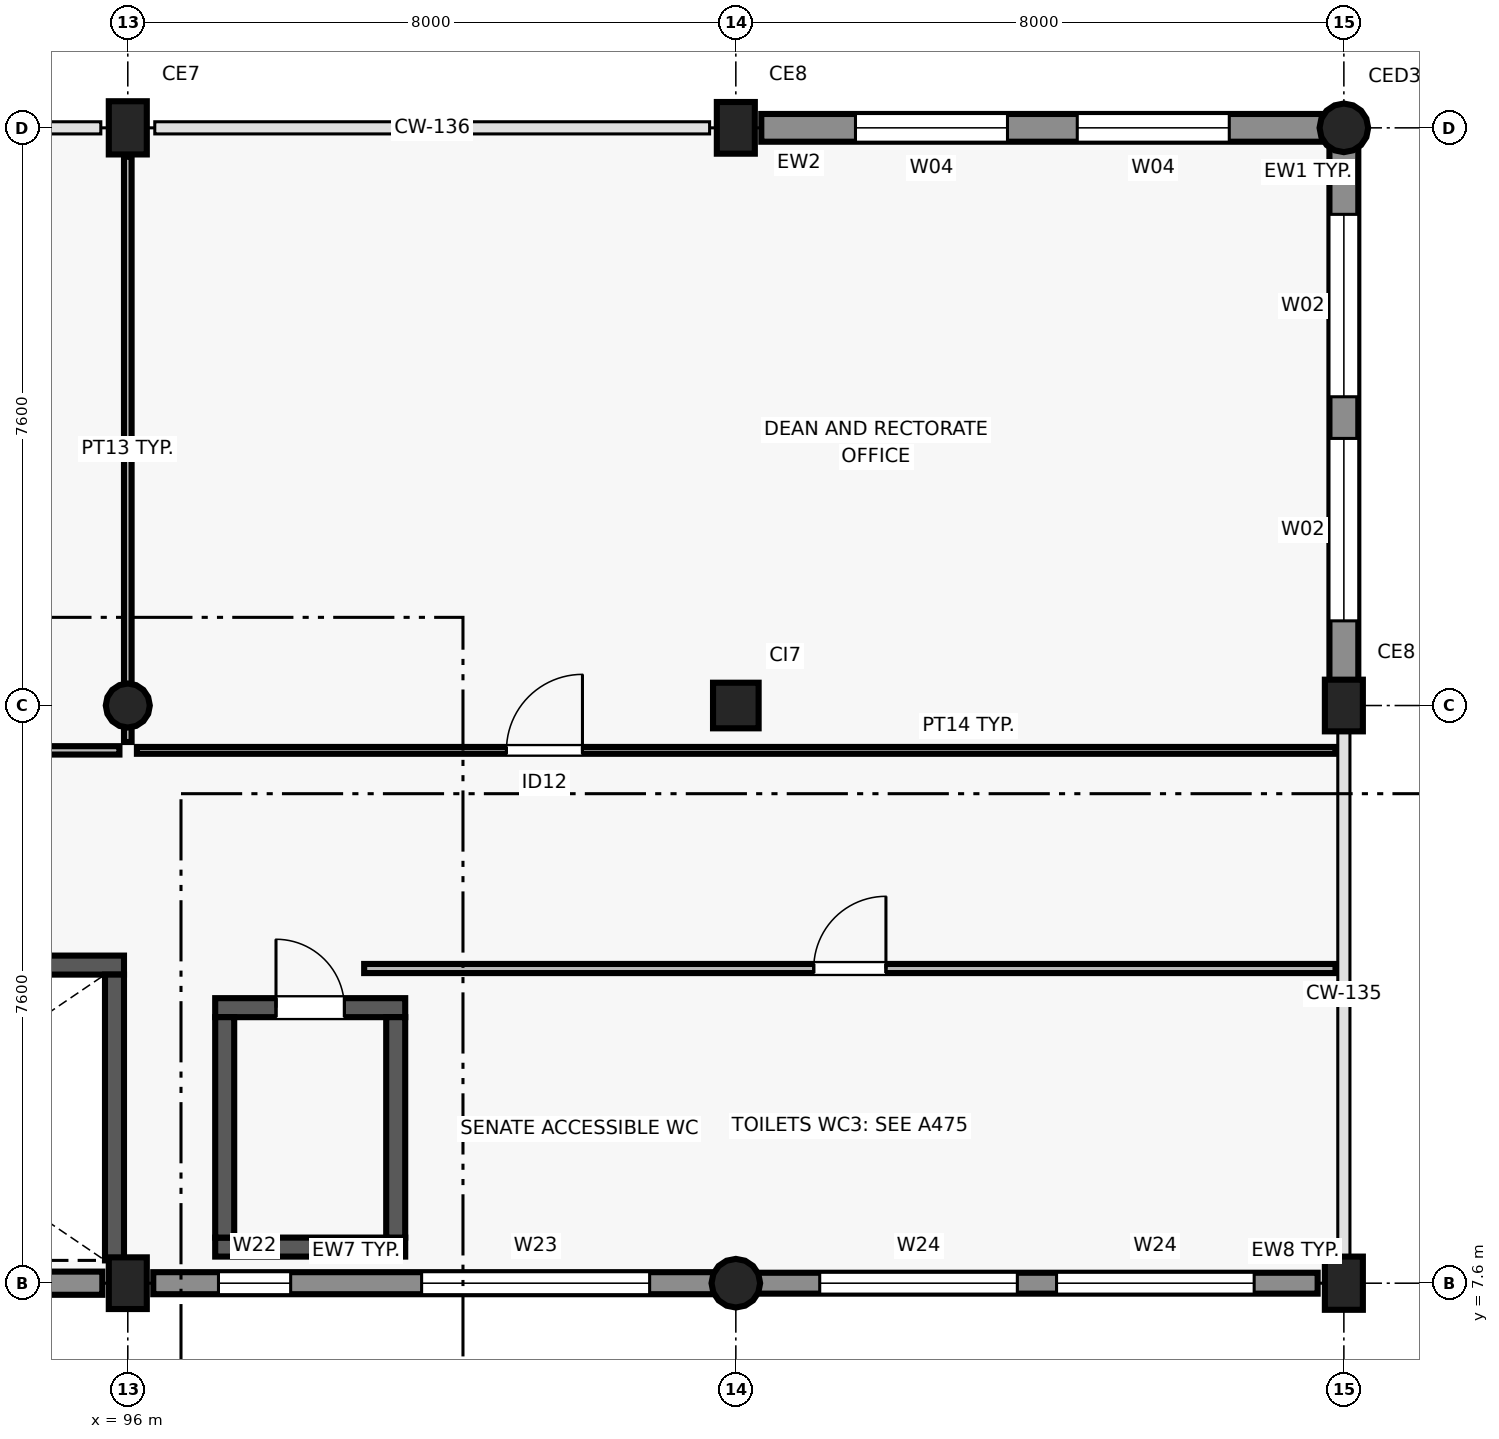
"""IFC4 building model, lengths in metres.
Left out: names, types, materials, properties, quantities, classifications, styles, units other than length and angle.
Written with IfcOpenShell. Run it as: python <this file> out.ifc"""

import sys

from ifc_helpers import new_model, si_unit, direction, frame, frame_2d, origin, origin_2d, place, context, subcontext, project, spatial, rectangle, circle, extrude, element, fill, save


model = new_model("IFC4")
c1 = context("Model", 3, precision=1e-05, world=origin(), true_north=direction((0.0, 1.0)))
c2 = subcontext(c1, "Body", "Model", "MODEL_VIEW")
j1 = project(units=[si_unit("LENGTHUNIT", "METRE"), si_unit("PLANEANGLEUNIT", "RADIAN")], contexts=[c1])
p1 = place(None, origin())
s1 = spatial("IfcSite", under=j1, at=p1, CompositionType="ELEMENT")
p2 = place(p1, origin())
s2 = spatial("IfcBuilding", under=s1, at=p2, CompositionType="ELEMENT")
p3 = place(p2, frame((0.0, 0.0, 13.2)))
s3 = spatial("IfcBuildingStorey", under=s2, at=p3, CompositionType="ELEMENT", Elevation=13.2)
p4 = place(p3, frame((96.0, 7.6, 0.0), z_axis=(0.0, 0.0, 1.0), x_axis=(1.0, 0.0, 0.0)))
e1 = element("IfcColumn", 1, at=p4, inside=s3, PredefinedType="COLUMN", context=c2, shape_type="SweptSolid", body=[
    extrude(rectangle(XDim=0.68, YDim=0.5, at=origin_2d()), origin(), (0.0, 0.0, 1.0), 4.2),
])
p5 = place(p3, frame((96.0, 15.2, 0.0), z_axis=(0.0, 0.0, 1.0), x_axis=(1.0, 0.0, 0.0)))
e2 = element("IfcColumn", 2, at=p5, inside=s3, PredefinedType="COLUMN", context=c2, shape_type="SweptSolid", body=[
    extrude(circle(Radius=0.29, at=origin_2d()), origin(), (0.0, 0.0, 1.0), 4.2),
])
p6 = place(p3, frame((96.0, 22.8, 0.0), z_axis=(0.0, 0.0, 1.0), x_axis=(1.0, 0.0, 0.0)))
e3 = element("IfcColumn", 3, at=p6, inside=s3, PredefinedType="COLUMN", context=c2, shape_type="SweptSolid", body=[
    extrude(rectangle(XDim=0.7, YDim=0.5, at=origin_2d()), origin(), (0.0, 0.0, 1.0), 4.2),
])
p7 = place(p3, frame((104.0, 7.6, 0.0), z_axis=(0.0, 0.0, 1.0), x_axis=(1.0, 0.0, 0.0)))
e4 = element("IfcColumn", 4, at=p7, inside=s3, PredefinedType="COLUMN", context=c2, shape_type="SweptSolid", body=[
    extrude(circle(Radius=0.32, at=origin_2d()), origin(), (0.0, 0.0, 1.0), 4.2),
])
p8 = place(p3, frame((104.0, 15.2, 0.0), z_axis=(0.0, 0.0, 1.0), x_axis=(1.0, 0.0, 0.0)))
e5 = element("IfcColumn", 5, at=p8, inside=s3, PredefinedType="COLUMN", context=c2, shape_type="SweptSolid", body=[
    extrude(rectangle(XDim=0.6, YDim=0.6, at=origin_2d()), origin(), (0.0, 0.0, 1.0), 4.2),
])
p9 = place(p3, frame((104.0, 22.8, 0.0), z_axis=(0.0, 0.0, 1.0), x_axis=(1.0, 0.0, 0.0)))
e6 = element("IfcColumn", 6, at=p9, inside=s3, PredefinedType="COLUMN", context=c2, shape_type="SweptSolid", body=[
    extrude(rectangle(XDim=0.68, YDim=0.5, at=origin_2d()), origin(), (0.0, 0.0, 1.0), 4.2),
])
p10 = place(p3, frame((112.0, 7.6, 0.0), z_axis=(0.0, 0.0, 1.0), x_axis=(1.0, 0.0, 0.0)))
e7 = element("IfcColumn", 7, at=p10, inside=s3, PredefinedType="COLUMN", context=c2, shape_type="SweptSolid", body=[
    extrude(rectangle(XDim=0.7, YDim=0.5, at=origin_2d()), origin(), (0.0, 0.0, 1.0), 4.2),
])
p11 = place(p3, frame((112.0, 15.2, 0.0), z_axis=(0.0, 0.0, 1.0), x_axis=(1.0, 0.0, 0.0)))
e8 = element("IfcColumn", 8, at=p11, inside=s3, PredefinedType="COLUMN", context=c2, shape_type="SweptSolid", body=[
    extrude(rectangle(XDim=0.68, YDim=0.5, at=origin_2d()), origin(), (0.0, 0.0, 1.0), 4.2),
])
p12 = place(p3, frame((112.0, 22.8, 0.0), z_axis=(0.0, 0.0, 1.0), x_axis=(1.0, 0.0, 0.0)))
e9 = element("IfcColumn", 9, at=p12, inside=s3, PredefinedType="COLUMN", context=c2, shape_type="SweptSolid", body=[
    extrude(circle(Radius=0.32, at=origin_2d()), origin(), (0.0, 0.0, 1.0), 4.2),
])
p13 = place(p3, frame((88.345, 7.6, 0.0), z_axis=(0.0, 0.0, 1.0), x_axis=(1.0, 0.0, 0.0)))
e10 = element("IfcWall", 10, at=p13, inside=s3, PredefinedType="SOLIDWALL", context=c2, shape_type="SweptSolid", body=[
    extrude(rectangle(XDim=7.32, YDim=0.305, at=frame_2d((3.66, 0.0))), origin(), (0.0, 0.0, 1.0), 3.92),
])
p14 = place(p3, frame((96.335, 7.6, 0.0), z_axis=(0.0, 0.0, 1.0), x_axis=(1.0, 0.0, 0.0)))
e11 = element("IfcWall", 11, at=p14, inside=s3, PredefinedType="SOLIDWALL", context=c2, shape_type="SweptSolid", body=[
    extrude(rectangle(XDim=7.396, YDim=0.29, at=frame_2d((3.698, 0.0))), origin(), (0.0, 0.0, 1.0), 3.92),
])
p15 = place(p14, frame((0.858, 0.0, 0.9)))
e12 = element("IfcOpeningElement", 12, at=p15, cuts=e11, PredefinedType="OPENING", context=c2, shape_type="SweptSolid", body=[
    extrude(rectangle(XDim=0.95, YDim=1.25, at=frame_2d((0.475, 0.625))), frame((0.0, 0.155, 0.0), z_axis=(0.0, -1.0, 0.0), x_axis=(1.0, 0.0, 0.0)), (0.0, 0.0, 1.0), 0.31),
])
p16 = place(p14, frame((3.531, 0.0, 0.9)))
e13 = element("IfcOpeningElement", 13, at=p16, cuts=e11, PredefinedType="OPENING", context=c2, shape_type="SweptSolid", body=[
    extrude(rectangle(XDim=3.0, YDim=1.65, at=frame_2d((1.5, 0.825))), frame((0.0, 0.155, 0.0), z_axis=(0.0, -1.0, 0.0), x_axis=(1.0, 0.0, 0.0)), (0.0, 0.0, 1.0), 0.31),
])
p17 = place(p3, frame((104.269, 7.6, 0.0), z_axis=(0.0, 0.0, 1.0), x_axis=(1.0, 0.0, 0.0)))
e14 = element("IfcWall", 14, at=p17, inside=s3, PredefinedType="SOLIDWALL", context=c2, shape_type="SweptSolid", body=[
    extrude(rectangle(XDim=7.386, YDim=0.275, at=frame_2d((3.693, 0.0))), origin(), (0.0, 0.0, 1.0), 3.36),
])
p18 = place(p17, frame((0.835, 0.0, 0.9)))
e15 = element("IfcOpeningElement", 15, at=p18, cuts=e14, PredefinedType="OPENING", context=c2, shape_type="SweptSolid", body=[
    extrude(rectangle(XDim=2.6, YDim=1.65, at=frame_2d((1.3, 0.825))), frame((0.0, 0.147, 0.0), z_axis=(0.0, -1.0, 0.0), x_axis=(1.0, 0.0, 0.0)), (0.0, 0.0, 1.0), 0.295),
])
p19 = place(p17, frame((3.951, 0.0, 0.9)))
e16 = element("IfcOpeningElement", 16, at=p19, cuts=e14, PredefinedType="OPENING", context=c2, shape_type="SweptSolid", body=[
    extrude(rectangle(XDim=2.6, YDim=1.65, at=frame_2d((1.3, 0.825))), frame((0.0, 0.147, 0.0), z_axis=(0.0, -1.0, 0.0), x_axis=(1.0, 0.0, 0.0)), (0.0, 0.0, 1.0), 0.295),
])
p20 = place(p3, frame((112.0, 15.445, 0.0), z_axis=(0.0, 0.0, 1.0), x_axis=(0.0, 1.0, 0.0)))
e17 = element("IfcWall", 17, at=p20, inside=s3, PredefinedType="SOLIDWALL", context=c2, shape_type="SweptSolid", body=[
    extrude(rectangle(XDim=7.086, YDim=0.38, at=frame_2d((3.543, 0.0))), origin(), (0.0, 0.0, 1.0), 3.38),
])
p21 = place(p20, frame((0.869, 0.0, 0.9)))
e18 = element("IfcOpeningElement", 18, at=p21, cuts=e17, PredefinedType="OPENING", context=c2, shape_type="SweptSolid", body=[
    extrude(rectangle(XDim=2.4, YDim=1.8, at=frame_2d((1.2, 0.9))), frame((0.0, 0.2, 0.0), z_axis=(0.0, -1.0, 0.0), x_axis=(1.0, 0.0, 0.0)), (0.0, 0.0, 1.0), 0.4),
])
p22 = place(p20, frame((3.817, 0.0, 0.9)))
e19 = element("IfcOpeningElement", 19, at=p22, cuts=e17, PredefinedType="OPENING", context=c2, shape_type="SweptSolid", body=[
    extrude(rectangle(XDim=2.4, YDim=1.8, at=frame_2d((1.2, 0.9))), frame((0.0, 0.2, 0.0), z_axis=(0.0, -1.0, 0.0), x_axis=(1.0, 0.0, 0.0)), (0.0, 0.0, 1.0), 0.4),
])
p23 = place(p3, frame((111.731, 22.8, 0.0), z_axis=(0.0, 0.0, 1.0), x_axis=(-1.0, 0.0, 0.0)))
e20 = element("IfcWall", 20, at=p23, inside=s3, PredefinedType="SOLIDWALL", context=c2, shape_type="SweptSolid", body=[
    extrude(rectangle(XDim=7.396, YDim=0.365, at=frame_2d((3.698, 0.0))), origin(), (0.0, 0.0, 1.0), 3.28),
])
p24 = place(p23, frame((1.239, 0.0, 0.9)))
e21 = element("IfcOpeningElement", 21, at=p24, cuts=e20, PredefinedType="OPENING", context=c2, shape_type="SweptSolid", body=[
    extrude(rectangle(XDim=2.0, YDim=1.8, at=frame_2d((1.0, 0.9))), frame((0.0, 0.192, 0.0), z_axis=(0.0, -1.0, 0.0), x_axis=(1.0, 0.0, 0.0)), (0.0, 0.0, 1.0), 0.385),
])
p25 = place(p23, frame((4.157, 0.0, 0.9)))
e22 = element("IfcOpeningElement", 22, at=p25, cuts=e20, PredefinedType="OPENING", context=c2, shape_type="SweptSolid", body=[
    extrude(rectangle(XDim=2.0, YDim=1.8, at=frame_2d((1.0, 0.9))), frame((0.0, 0.192, 0.0), z_axis=(0.0, -1.0, 0.0), x_axis=(1.0, 0.0, 0.0)), (0.0, 0.0, 1.0), 0.385),
])
p26 = place(p3, frame((88.05, 11.785, 0.0), z_axis=(0.0, 0.0, 1.0), x_axis=(1.0, 0.0, 0.0)))
e23 = element("IfcWall", 23, at=p26, inside=s3, PredefinedType="SHEAR", context=c2, shape_type="SweptSolid", body=[
    extrude(rectangle(XDim=7.9, YDim=0.25, at=frame_2d((3.95, 0.0))), origin(), (0.0, 0.0, 1.0), 3.92),
])
p27 = place(p26, frame((0.5, 0.0, 0.0)))
e24 = element("IfcOpeningElement", 24, at=p27, cuts=e23, PredefinedType="OPENING", context=c2, shape_type="SweptSolid", body=[
    extrude(rectangle(XDim=1.25, YDim=2.2, at=frame_2d((0.625, 1.1))), frame((0.0, 0.135, 0.0), z_axis=(0.0, -1.0, 0.0), x_axis=(1.0, 0.0, 0.0)), (0.0, 0.0, 1.0), 0.27),
])
p28 = place(p3, frame((95.825, 7.9, 0.0), z_axis=(0.0, 0.0, 1.0), x_axis=(0.0, 1.0, 0.0)))
e25 = element("IfcWall", 25, at=p28, inside=s3, PredefinedType="SHEAR", context=c2, shape_type="SweptSolid", body=[
    extrude(rectangle(XDim=3.76, YDim=0.25, at=frame_2d((1.88, 0.0))), origin(), (0.0, 0.0, 1.0), 3.92),
])
p29 = place(p3, frame((97.15, 8.075, 0.0), z_axis=(0.0, 0.0, 1.0), x_axis=(1.0, 0.0, 0.0)))
e26 = element("IfcWall", 26, at=p29, inside=s3, PredefinedType="SHEAR", context=c2, shape_type="SweptSolid", body=[
    extrude(rectangle(XDim=2.5, YDim=0.25, at=frame_2d((1.25, 0.0))), origin(), (0.0, 0.0, 1.0), 3.92),
])
p30 = place(p3, frame((97.15, 11.225, 0.0), z_axis=(0.0, 0.0, 1.0), x_axis=(1.0, 0.0, 0.0)))
e27 = element("IfcWall", 27, at=p30, inside=s3, PredefinedType="SHEAR", context=c2, shape_type="SweptSolid", body=[
    extrude(rectangle(XDim=2.5, YDim=0.25, at=frame_2d((1.25, 0.0))), origin(), (0.0, 0.0, 1.0), 3.92),
])
p31 = place(p30, frame((0.8, 0.0, 0.0)))
e28 = element("IfcOpeningElement", 28, at=p31, cuts=e27, PredefinedType="OPENING", context=c2, shape_type="SweptSolid", body=[
    extrude(rectangle(XDim=0.9, YDim=2.05, at=frame_2d((0.45, 1.025))), frame((0.0, 0.135, 0.0), z_axis=(0.0, -1.0, 0.0), x_axis=(1.0, 0.0, 0.0)), (0.0, 0.0, 1.0), 0.27),
])
for number, where, z_axis, x_axis in (
    (29, (97.275, 8.2, 0.0), (0.0, 0.0, 1.0), (0.0, 1.0, 0.0)),
    (30, (99.525, 8.2, 0.0), (0.0, 0.0, 1.0), (0.0, 1.0, 0.0)),
):
    element("IfcWall", number, at=place(p3, frame(where, z_axis=z_axis, x_axis=x_axis)), inside=s3, PredefinedType="SHEAR", context=c2, shape_type="SweptSolid", body=[
        extrude(rectangle(XDim=2.9, YDim=0.25, at=frame_2d((1.45, 0.0))), origin(), (0.0, 0.0, 1.0), 3.92),
    ])
p32 = place(p3, frame((99.11, 11.74, 0.0), z_axis=(0.0, 0.0, 1.0), x_axis=(1.0, 0.0, 0.0)))
e31 = element("IfcWall", 31, at=p32, inside=s3, PredefinedType="PARTITIONING", context=c2, shape_type="SweptSolid", body=[
    extrude(rectangle(XDim=12.78, YDim=0.12, at=frame_2d((6.39, 0.0))), origin(), (0.0, 0.0, 1.0), 3.9),
])
p33 = place(p32, frame((5.915, 0.0, 0.0)))
e32 = element("IfcOpeningElement", 32, at=p33, cuts=e31, PredefinedType="OPENING", context=c2, shape_type="SweptSolid", body=[
    extrude(rectangle(XDim=0.95, YDim=2.1, at=frame_2d((0.475, 1.05))), frame((0.0, 0.07, 0.0), z_axis=(0.0, -1.0, 0.0), x_axis=(1.0, 0.0, 0.0)), (0.0, 0.0, 1.0), 0.14),
])
p34 = place(p3, frame((72.11, 14.61, 0.0), z_axis=(0.0, 0.0, 1.0), x_axis=(1.0, 0.0, 0.0)))
e33 = element("IfcWall", 33, at=p34, inside=s3, PredefinedType="PARTITIONING", context=c2, shape_type="SweptSolid", body=[
    extrude(rectangle(XDim=23.78, YDim=0.11, at=frame_2d((11.89, 0.0))), origin(), (0.0, 0.0, 1.0), 3.9),
])
p35 = place(p34, frame((11.37, 0.0, 0.0)))
e34 = element("IfcOpeningElement", 34, at=p35, cuts=e33, PredefinedType="OPENING", context=c2, shape_type="SweptSolid", body=[
    extrude(rectangle(XDim=1.04, YDim=2.15, at=frame_2d((0.52, 1.075))), frame((0.0, 0.065, 0.0), z_axis=(0.0, -1.0, 0.0), x_axis=(1.0, 0.0, 0.0)), (0.0, 0.0, 1.0), 0.13),
])
p36 = place(p3, frame((96.0, 14.72, 0.0), z_axis=(0.0, 0.0, 1.0), x_axis=(0.0, 1.0, 0.0)))
e35 = element("IfcWall", 35, at=p36, inside=s3, PredefinedType="PARTITIONING", context=c2, shape_type="SweptSolid", body=[
    extrude(rectangle(XDim=7.7, YDim=0.1, at=frame_2d((3.85, 0.0))), origin(), (0.0, 0.0, 1.0), 3.38),
])
p37 = place(p3, frame((96.12, 14.61, 0.0), z_axis=(0.0, 0.0, 1.0), x_axis=(1.0, 0.0, 0.0)))
e36 = element("IfcWall", 36, at=p37, inside=s3, PredefinedType="PARTITIONING", context=c2, shape_type="SweptSolid", body=[
    extrude(rectangle(XDim=15.77, YDim=0.09, at=frame_2d((7.885, 0.0))), origin(), (0.0, 0.0, 1.0), 3.9),
])
p38 = place(p37, frame((4.862, 0.0, 0.0)))
e37 = element("IfcOpeningElement", 37, at=p38, cuts=e36, PredefinedType="OPENING", context=c2, shape_type="SweptSolid", body=[
    extrude(rectangle(XDim=1.0, YDim=2.15, at=frame_2d((0.5, 1.075))), frame((0.0, 0.055, 0.0), z_axis=(0.0, -1.0, 0.0), x_axis=(1.0, 0.0, 0.0)), (0.0, 0.0, 1.0), 0.11),
])
p39 = place(p15, origin())
e38 = element("IfcWindow", 38, at=p39, inside=s3, PartitioningType="SINGLE_PANEL", PredefinedType="WINDOW", context=c2, shape_type="SweptSolid", body=[
    extrude(rectangle(XDim=0.95, YDim=1.25, at=frame_2d((0.475, 0.625))), frame((0.0, 0.03, 0.0), z_axis=(0.0, -1.0, 0.0), x_axis=(1.0, 0.0, 0.0)), (0.0, 0.0, 1.0), 0.06),
])
fill(e12, e38)
p40 = place(p16, origin())
e39 = element("IfcWindow", 39, at=p40, inside=s3, PartitioningType="SINGLE_PANEL", PredefinedType="WINDOW", context=c2, shape_type="SweptSolid", body=[
    extrude(rectangle(XDim=3.0, YDim=1.65, at=frame_2d((1.5, 0.825))), frame((0.0, 0.03, 0.0), z_axis=(0.0, -1.0, 0.0), x_axis=(1.0, 0.0, 0.0)), (0.0, 0.0, 1.0), 0.06),
])
fill(e13, e39)
p41 = place(p18, origin())
e40 = element("IfcWindow", 40, at=p41, inside=s3, PartitioningType="SINGLE_PANEL", PredefinedType="WINDOW", context=c2, shape_type="SweptSolid", body=[
    extrude(rectangle(XDim=2.6, YDim=1.65, at=frame_2d((1.3, 0.825))), frame((0.0, 0.03, 0.0), z_axis=(0.0, -1.0, 0.0), x_axis=(1.0, 0.0, 0.0)), (0.0, 0.0, 1.0), 0.06),
])
fill(e15, e40)
p42 = place(p19, origin())
e41 = element("IfcWindow", 41, at=p42, inside=s3, PartitioningType="SINGLE_PANEL", PredefinedType="WINDOW", context=c2, shape_type="SweptSolid", body=[
    extrude(rectangle(XDim=2.6, YDim=1.65, at=frame_2d((1.3, 0.825))), frame((0.0, 0.03, 0.0), z_axis=(0.0, -1.0, 0.0), x_axis=(1.0, 0.0, 0.0)), (0.0, 0.0, 1.0), 0.06),
])
fill(e16, e41)
p43 = place(p21, origin())
e42 = element("IfcWindow", 42, at=p43, inside=s3, PartitioningType="SINGLE_PANEL", PredefinedType="WINDOW", context=c2, shape_type="SweptSolid", body=[
    extrude(rectangle(XDim=2.4, YDim=1.8, at=frame_2d((1.2, 0.9))), frame((0.0, 0.03, 0.0), z_axis=(0.0, -1.0, 0.0), x_axis=(1.0, 0.0, 0.0)), (0.0, 0.0, 1.0), 0.06),
])
fill(e18, e42)
p44 = place(p22, origin())
e43 = element("IfcWindow", 43, at=p44, inside=s3, PartitioningType="SINGLE_PANEL", PredefinedType="WINDOW", context=c2, shape_type="SweptSolid", body=[
    extrude(rectangle(XDim=2.4, YDim=1.8, at=frame_2d((1.2, 0.9))), frame((0.0, 0.03, 0.0), z_axis=(0.0, -1.0, 0.0), x_axis=(1.0, 0.0, 0.0)), (0.0, 0.0, 1.0), 0.06),
])
fill(e19, e43)
p45 = place(p24, origin())
e44 = element("IfcWindow", 44, at=p45, inside=s3, PartitioningType="SINGLE_PANEL", PredefinedType="WINDOW", context=c2, shape_type="SweptSolid", body=[
    extrude(rectangle(XDim=2.0, YDim=1.8, at=frame_2d((1.0, 0.9))), frame((0.0, 0.03, 0.0), z_axis=(0.0, -1.0, 0.0), x_axis=(1.0, 0.0, 0.0)), (0.0, 0.0, 1.0), 0.06),
])
fill(e21, e44)
p46 = place(p25, origin())
e45 = element("IfcWindow", 45, at=p46, inside=s3, PartitioningType="SINGLE_PANEL", PredefinedType="WINDOW", context=c2, shape_type="SweptSolid", body=[
    extrude(rectangle(XDim=2.0, YDim=1.8, at=frame_2d((1.0, 0.9))), frame((0.0, 0.03, 0.0), z_axis=(0.0, -1.0, 0.0), x_axis=(1.0, 0.0, 0.0)), (0.0, 0.0, 1.0), 0.06),
])
fill(e22, e45)
p47 = place(p31, origin())
e46 = element("IfcDoor", 46, at=p47, inside=s3, OperationType="SINGLE_SWING_LEFT", PredefinedType="DOOR", context=c2, shape_type="SweptSolid", body=[
    extrude(rectangle(XDim=0.9, YDim=2.05, at=frame_2d((0.45, 1.025))), frame((0.0, 0.025, 0.0), z_axis=(0.0, -1.0, 0.0), x_axis=(1.0, 0.0, 0.0)), (0.0, 0.0, 1.0), 0.05),
])
fill(e28, e46)
p48 = place(p33, origin())
e47 = element("IfcDoor", 47, at=p48, inside=s3, OperationType="SINGLE_SWING_RIGHT", PredefinedType="DOOR", context=c2, shape_type="SweptSolid", body=[
    extrude(rectangle(XDim=0.95, YDim=2.1, at=frame_2d((0.475, 1.05))), frame((0.0, 0.025, 0.0), z_axis=(0.0, -1.0, 0.0), x_axis=(1.0, 0.0, 0.0)), (0.0, 0.0, 1.0), 0.05),
])
fill(e32, e47)
p49 = place(p38, origin())
e48 = element("IfcDoor", 48, at=p49, inside=s3, OperationType="SINGLE_SWING_RIGHT", PredefinedType="DOOR", context=c2, shape_type="SweptSolid", body=[
    extrude(rectangle(XDim=1.0, YDim=2.15, at=frame_2d((0.5, 1.075))), frame((0.0, 0.025, 0.0), z_axis=(0.0, -1.0, 0.0), x_axis=(1.0, 0.0, 0.0)), (0.0, 0.0, 1.0), 0.05),
])
fill(e37, e48)
save(model, sys.argv[1])
